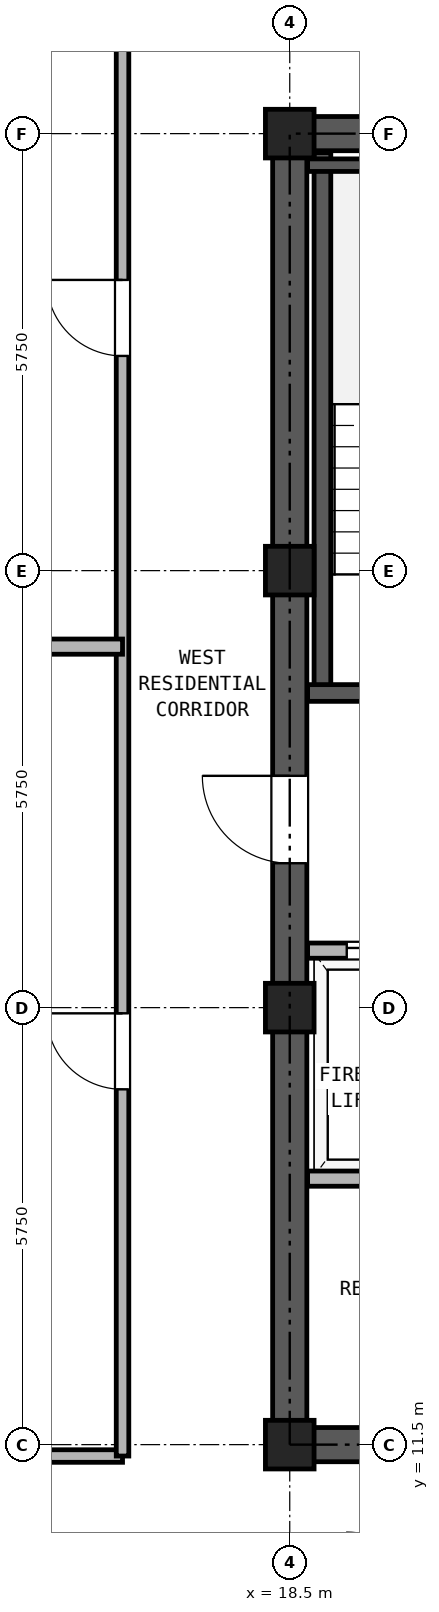
"""IFC4 building model, lengths in metres.
Left out: names, types, materials, properties, quantities, classifications, styles, units other than length and angle.
Written with IfcOpenShell. Run it as: python <this file> out.ifc"""

import sys

from ifc_helpers import new_model, si_unit, direction, frame, frame_2d, origin, origin_2d, place, context, subcontext, project, spatial, rectangle, hollow_rectangle, extrude, source, transform, mapped, element, fill, save


model = new_model("IFC4")
c1 = context("Model", 3, precision=1e-05, world=origin(), true_north=direction((0.0, 1.0)))
c2 = subcontext(c1, "Body", "Model", "MODEL_VIEW")
j1 = project(units=[si_unit("LENGTHUNIT", "METRE"), si_unit("PLANEANGLEUNIT", "RADIAN")], contexts=[c1])
p1 = place(None, origin())
s1 = spatial("IfcSite", under=j1, at=p1, CompositionType="ELEMENT")
p2 = place(p1, origin())
s2 = spatial("IfcBuilding", under=s1, at=p2, CompositionType="ELEMENT")
p3 = place(p2, frame((0.0, 0.0, 209.2)))
s3 = spatial("IfcBuildingStorey", under=s2, at=p3, CompositionType="ELEMENT", Elevation=209.2)
m1 = source(origin(), c2, "Body", "SweptSolid", [
    extrude(hollow_rectangle(XDim=0.64, YDim=0.64, WallThickness=0.035, at=origin_2d()), origin(), (0.0, 0.0, 1.0), 2.95),
])
for number, where, z_axis, x_axis in (
    (1, (18.5, 11.5, 0.0), (0.0, 0.0, 1.0), (1.0, 0.0, 0.0)),
    (2, (18.5, 17.25, 0.0), (0.0, 0.0, 1.0), (1.0, 0.0, 0.0)),
    (3, (18.5, 23.0, 0.0), (0.0, 0.0, 1.0), (1.0, 0.0, 0.0)),
    (4, (18.5, 28.75, 0.0), (0.0, 0.0, 1.0), (1.0, 0.0, 0.0)),
):
    element("IfcColumn", number, at=place(p3, frame(where, z_axis=z_axis, x_axis=x_axis)), inside=s3, PredefinedType="COLUMN", context=c2, shape_type="MappedRepresentation", body=[
        mapped(m1, transform((0.0, 0.0, 0.0), x_axis=(1.0, 0.0, 0.0), y_axis=(0.0, 1.0, 0.0), z_axis=(0.0, 0.0, 1.0), scale=1.0)),
    ])
p4 = place(p3, frame((18.275, 11.5, 0.0), z_axis=(0.0, 0.0, 1.0), x_axis=(1.0, 0.0, 0.0)))
e5 = element("IfcWall", 5, at=p4, inside=s3, PredefinedType="SHEAR", context=c2, shape_type="SweptSolid", body=[
    extrude(rectangle(XDim=10.45, YDim=0.45, at=frame_2d((5.225, 0.0))), origin(), (0.0, 0.0, 1.0), 2.95),
])
p5 = place(p4, frame((1.825, 0.0, 0.0)))
e6 = element("IfcOpeningElement", 6, at=p5, cuts=e5, PredefinedType="OPENING", context=c2, shape_type="SweptSolid", body=[
    extrude(rectangle(XDim=0.95, YDim=2.15, at=frame_2d((0.475, 1.075))), frame((0.0, 0.235, 0.0), z_axis=(0.0, -1.0, 0.0), x_axis=(1.0, 0.0, 0.0)), (0.0, 0.0, 1.0), 0.47),
])
p6 = place(p4, frame((5.325, 0.0, 0.0)))
e7 = element("IfcOpeningElement", 7, at=p6, cuts=e5, PredefinedType="OPENING", context=c2, shape_type="SweptSolid", body=[
    extrude(rectangle(XDim=0.95, YDim=2.15, at=frame_2d((0.475, 1.075))), frame((0.0, 0.235, 0.0), z_axis=(0.0, -1.0, 0.0), x_axis=(1.0, 0.0, 0.0)), (0.0, 0.0, 1.0), 0.47),
])
p7 = place(p4, frame((8.225, 0.0, 0.0)))
e8 = element("IfcOpeningElement", 8, at=p7, cuts=e5, PredefinedType="OPENING", context=c2, shape_type="SweptSolid", body=[
    extrude(rectangle(XDim=1.1, YDim=2.25, at=frame_2d((0.55, 1.125))), frame((0.0, 0.235, 0.0), z_axis=(0.0, -1.0, 0.0), x_axis=(1.0, 0.0, 0.0)), (0.0, 0.0, 1.0), 0.47),
])
p8 = place(p3, frame((18.275, 28.75, 0.0), z_axis=(0.0, 0.0, 1.0), x_axis=(1.0, 0.0, 0.0)))
e9 = element("IfcWall", 9, at=p8, inside=s3, PredefinedType="SHEAR", context=c2, shape_type="SweptSolid", body=[
    extrude(rectangle(XDim=10.45, YDim=0.45, at=frame_2d((5.225, 0.0))), origin(), (0.0, 0.0, 1.0), 2.95),
])
p9 = place(p8, frame((4.105, 0.0, 0.0)))
e10 = element("IfcOpeningElement", 10, at=p9, cuts=e9, PredefinedType="OPENING", context=c2, shape_type="SweptSolid", body=[
    extrude(rectangle(XDim=0.9, YDim=2.05, at=frame_2d((0.45, 1.025))), frame((0.0, 0.235, 0.0), z_axis=(0.0, -1.0, 0.0), x_axis=(1.0, 0.0, 0.0)), (0.0, 0.0, 1.0), 0.47),
])
p10 = place(p8, frame((5.645, 0.0, 0.0)))
e11 = element("IfcOpeningElement", 11, at=p10, cuts=e9, PredefinedType="OPENING", context=c2, shape_type="SweptSolid", body=[
    extrude(rectangle(XDim=0.9, YDim=2.05, at=frame_2d((0.45, 1.025))), frame((0.0, 0.235, 0.0), z_axis=(0.0, -1.0, 0.0), x_axis=(1.0, 0.0, 0.0)), (0.0, 0.0, 1.0), 0.47),
])
p11 = place(p3, frame((18.5, 11.725, 0.0), z_axis=(0.0, 0.0, 1.0), x_axis=(0.0, 1.0, 0.0)))
e12 = element("IfcWall", 12, at=p11, inside=s3, PredefinedType="SHEAR", context=c2, shape_type="SweptSolid", body=[
    extrude(rectangle(XDim=16.8, YDim=0.45, at=frame_2d((8.4, 0.0))), origin(), (0.0, 0.0, 1.0), 2.95),
])
p12 = place(p11, frame((7.425, 0.0, 0.0)))
e13 = element("IfcOpeningElement", 13, at=p12, cuts=e12, PredefinedType="OPENING", context=c2, shape_type="SweptSolid", body=[
    extrude(rectangle(XDim=1.15, YDim=2.2, at=frame_2d((0.575, 1.1))), frame((0.0, 0.235, 0.0), z_axis=(0.0, -1.0, 0.0), x_axis=(1.0, 0.0, 0.0)), (0.0, 0.0, 1.0), 0.47),
])
p13 = place(p3, frame((18.93, 21.39, 0.0), z_axis=(0.0, 0.0, 1.0), x_axis=(0.0, 1.0, 0.0)))
e14 = element("IfcWall", 14, at=p13, inside=s3, PredefinedType="SOLIDWALL", context=c2, shape_type="SweptSolid", body=[
    extrude(rectangle(XDim=7.11, YDim=0.22, at=frame_2d((3.555, 0.0))), origin(), (0.0, 0.0, 1.0), 2.95),
])
p14 = place(p3, frame((18.735, 28.335, 0.0), z_axis=(0.0, 0.0, 1.0), x_axis=(1.0, 0.0, 0.0)))
e15 = element("IfcWall", 15, at=p14, inside=s3, PredefinedType="PARTITIONING", context=c2, shape_type="SweptSolid", body=[
    extrude(rectangle(XDim=3.375, YDim=0.165, at=frame_2d((1.688, 0.0))), origin(), (0.0, 0.0, 1.0), 2.95),
])
p15 = place(p3, frame((18.735, 21.39, 0.0), z_axis=(0.0, 0.0, 1.0), x_axis=(1.0, 0.0, 0.0)))
e16 = element("IfcWall", 16, at=p15, inside=s3, PredefinedType="SOLIDWALL", context=c2, shape_type="SweptSolid", body=[
    extrude(rectangle(XDim=6.395, YDim=0.22, at=frame_2d((3.197, 0.0))), origin(), (0.0, 0.0, 1.0), 2.95),
])
p16 = place(p15, frame((1.115, 0.0, 0.0)))
e17 = element("IfcOpeningElement", 17, at=p16, cuts=e16, PredefinedType="OPENING", context=c2, shape_type="SweptSolid", body=[
    extrude(rectangle(XDim=1.15, YDim=2.2, at=frame_2d((0.575, 1.1))), frame((0.0, 0.12, 0.0), z_axis=(0.0, -1.0, 0.0), x_axis=(1.0, 0.0, 0.0)), (0.0, 0.0, 1.0), 0.24),
])
p17 = place(p15, frame((4.845, 0.0, 0.0)))
e18 = element("IfcOpeningElement", 18, at=p17, cuts=e16, PredefinedType="OPENING", context=c2, shape_type="SweptSolid", body=[
    extrude(rectangle(XDim=1.1, YDim=2.25, at=frame_2d((0.55, 1.125))), frame((0.0, 0.12, 0.0), z_axis=(0.0, -1.0, 0.0), x_axis=(1.0, 0.0, 0.0)), (0.0, 0.0, 1.0), 0.24),
])
p18 = place(p3, frame((18.735, 18.0, 0.0), z_axis=(0.0, 0.0, 1.0), x_axis=(1.0, 0.0, 0.0)))
e19 = element("IfcWall", 19, at=p18, inside=s3, PredefinedType="PARTITIONING", context=c2, shape_type="SweptSolid", body=[
    extrude(rectangle(XDim=9.53, YDim=0.2, at=frame_2d((4.765, 0.0))), origin(), (0.0, 0.0, 1.0), 2.95),
])
p19 = place(p18, frame((0.515, 0.0, 0.0)))
e20 = element("IfcOpeningElement", 20, at=p19, cuts=e19, PredefinedType="OPENING", context=c2, shape_type="SweptSolid", body=[
    extrude(rectangle(XDim=1.3, YDim=2.3, at=frame_2d((0.65, 1.15))), frame((0.0, 0.11, 0.0), z_axis=(0.0, -1.0, 0.0), x_axis=(1.0, 0.0, 0.0)), (0.0, 0.0, 1.0), 0.22),
])
p20 = place(p18, frame((2.615, 0.0, 0.0)))
e21 = element("IfcOpeningElement", 21, at=p20, cuts=e19, PredefinedType="OPENING", context=c2, shape_type="SweptSolid", body=[
    extrude(rectangle(XDim=1.3, YDim=2.3, at=frame_2d((0.65, 1.15))), frame((0.0, 0.11, 0.0), z_axis=(0.0, -1.0, 0.0), x_axis=(1.0, 0.0, 0.0)), (0.0, 0.0, 1.0), 0.22),
])
p21 = place(p18, frame((5.015, 0.0, 0.0)))
e22 = element("IfcOpeningElement", 22, at=p21, cuts=e19, PredefinedType="OPENING", context=c2, shape_type="SweptSolid", body=[
    extrude(rectangle(XDim=0.9, YDim=2.05, at=frame_2d((0.45, 1.025))), frame((0.0, 0.11, 0.0), z_axis=(0.0, -1.0, 0.0), x_axis=(1.0, 0.0, 0.0)), (0.0, 0.0, 1.0), 0.22),
])
p22 = place(p18, frame((7.715, 0.0, 0.0)))
e23 = element("IfcOpeningElement", 23, at=p22, cuts=e19, PredefinedType="OPENING", context=c2, shape_type="SweptSolid", body=[
    extrude(rectangle(XDim=0.9, YDim=2.05, at=frame_2d((0.45, 1.025))), frame((0.0, 0.11, 0.0), z_axis=(0.0, -1.0, 0.0), x_axis=(1.0, 0.0, 0.0)), (0.0, 0.0, 1.0), 0.22),
])
p23 = place(p3, frame((18.735, 15.0, 0.0), z_axis=(0.0, 0.0, 1.0), x_axis=(1.0, 0.0, 0.0)))
e24 = element("IfcWall", 24, at=p23, inside=s3, PredefinedType="PARTITIONING", context=c2, shape_type="SweptSolid", body=[
    extrude(rectangle(XDim=9.53, YDim=0.2, at=frame_2d((4.765, 0.0))), origin(), (0.0, 0.0, 1.0), 2.95),
])
p24 = place(p3, frame((7.6, 11.35, 0.0), z_axis=(0.0, 0.0, 1.0), x_axis=(1.0, 0.0, 0.0)))
e25 = element("IfcWall", 25, at=p24, inside=s3, PredefinedType="PARTITIONING", context=c2, shape_type="SweptSolid", body=[
    extrude(rectangle(XDim=8.7, YDim=0.165, at=frame_2d((4.35, 0.0))), origin(), (0.0, 0.0, 1.0), 2.323),
])
p25 = place(p3, frame((16.3, 11.35, 0.0), z_axis=(0.0, 0.0, 1.0), x_axis=(0.0, 1.0, 0.0)))
e26 = element("IfcWall", 26, at=p25, inside=s3, PredefinedType="PARTITIONING", context=c2, shape_type="SweptSolid", body=[
    extrude(rectangle(XDim=23.79, YDim=0.165, at=frame_2d((11.895, 0.0))), origin(), (0.0, 0.0, 1.0), 2.95),
])
p26 = place(p25, frame((4.825, 0.0, 0.0)))
e27 = element("IfcOpeningElement", 27, at=p26, cuts=e26, PredefinedType="OPENING", context=c2, shape_type="SweptSolid", body=[
    extrude(rectangle(XDim=1.0, YDim=2.15, at=frame_2d((0.5, 1.075))), frame((0.0, 0.093, 0.0), z_axis=(0.0, -1.0, 0.0), x_axis=(1.0, 0.0, 0.0)), (0.0, 0.0, 1.0), 0.185),
])
p27 = place(p25, frame((14.475, 0.0, 0.0)))
e28 = element("IfcOpeningElement", 28, at=p27, cuts=e26, PredefinedType="OPENING", context=c2, shape_type="SweptSolid", body=[
    extrude(rectangle(XDim=1.0, YDim=2.15, at=frame_2d((0.5, 1.075))), frame((0.0, 0.093, 0.0), z_axis=(0.0, -1.0, 0.0), x_axis=(1.0, 0.0, 0.0)), (0.0, 0.0, 1.0), 0.185),
])
p28 = place(p3, frame((0.16, 22.0, 0.0), z_axis=(0.0, 0.0, 1.0), x_axis=(1.0, 0.0, 0.0)))
e29 = element("IfcWall", 29, at=p28, inside=s3, PredefinedType="PARTITIONING", context=c2, shape_type="SweptSolid", body=[
    extrude(rectangle(XDim=16.14, YDim=0.2, at=frame_2d((8.07, 0.0))), origin(), (0.0, 0.0, 1.0), 2.95),
])
p29 = place(p19, origin())
e30 = element("IfcDoor", 30, at=p29, inside=s3, OperationType="DOUBLE_DOOR_SLIDING", PredefinedType="DOOR", context=c2, shape_type="SweptSolid", body=[
    extrude(rectangle(XDim=1.3, YDim=2.3, at=frame_2d((0.65, 1.15))), frame((0.0, 0.025, 0.0), z_axis=(0.0, -1.0, 0.0), x_axis=(1.0, 0.0, 0.0)), (0.0, 0.0, 1.0), 0.05),
])
fill(e20, e30)
p30 = place(p12, frame((1.15, 0.0, 0.0), z_axis=(0.0, 0.0, 1.0), x_axis=(-1.0, 0.0, 0.0)))
e31 = element("IfcDoor", 31, at=p30, inside=s3, OperationType="SINGLE_SWING_RIGHT", PredefinedType="DOOR", context=c2, shape_type="SweptSolid", body=[
    extrude(rectangle(XDim=1.15, YDim=2.2, at=frame_2d((0.575, 1.1))), frame((0.0, 0.025, 0.0), z_axis=(0.0, -1.0, 0.0), x_axis=(1.0, 0.0, 0.0)), (0.0, 0.0, 1.0), 0.05),
])
fill(e13, e31)
p31 = place(p26, origin())
e32 = element("IfcDoor", 32, at=p31, inside=s3, OperationType="SINGLE_SWING_RIGHT", PredefinedType="DOOR", context=c2, shape_type="SweptSolid", body=[
    extrude(rectangle(XDim=1.0, YDim=2.15, at=frame_2d((0.5, 1.075))), frame((0.0, 0.025, 0.0), z_axis=(0.0, -1.0, 0.0), x_axis=(1.0, 0.0, 0.0)), (0.0, 0.0, 1.0), 0.05),
])
fill(e27, e32)
p32 = place(p27, origin())
e33 = element("IfcDoor", 33, at=p32, inside=s3, OperationType="SINGLE_SWING_RIGHT", PredefinedType="DOOR", context=c2, shape_type="SweptSolid", body=[
    extrude(rectangle(XDim=1.0, YDim=2.15, at=frame_2d((0.5, 1.075))), frame((0.0, 0.025, 0.0), z_axis=(0.0, -1.0, 0.0), x_axis=(1.0, 0.0, 0.0)), (0.0, 0.0, 1.0), 0.05),
])
fill(e28, e33)
save(model, sys.argv[1])
